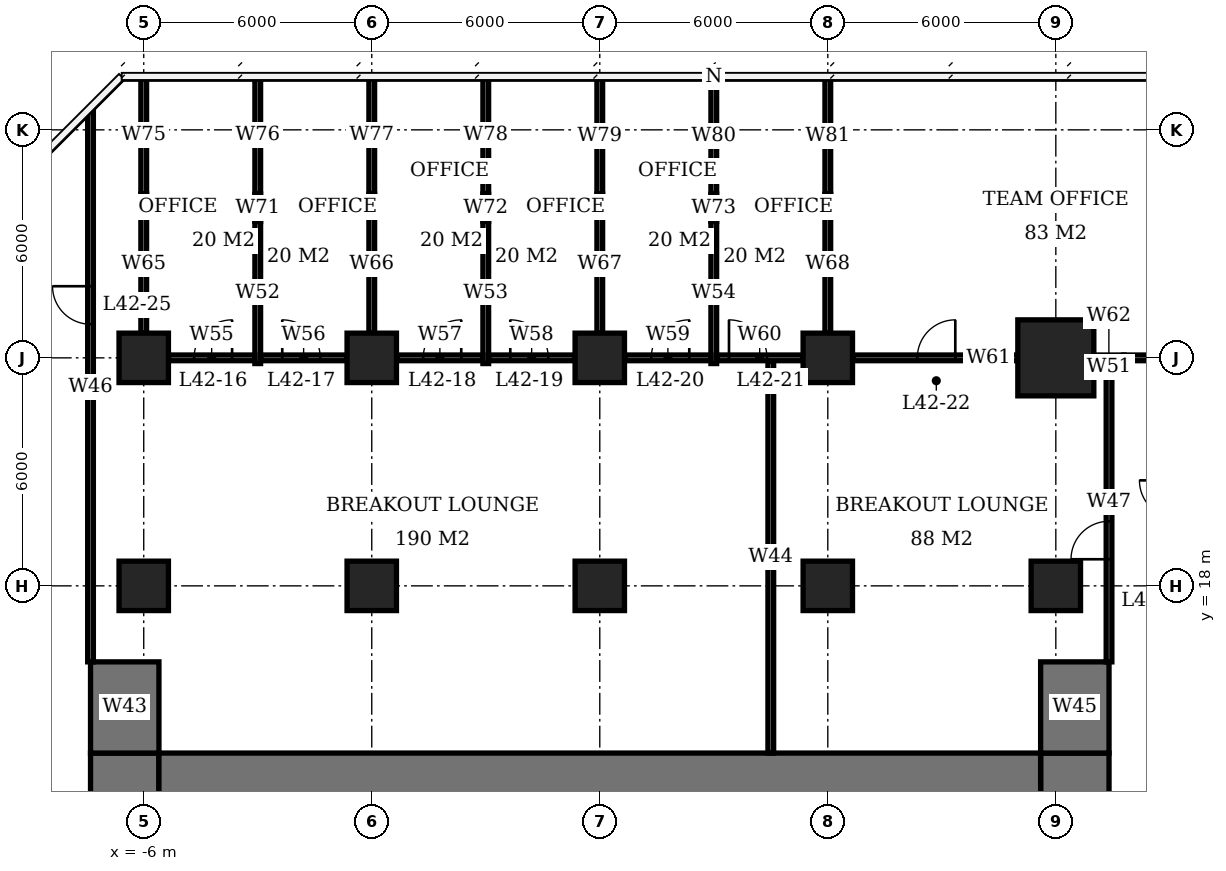
"""IFC4 building model, lengths in metres.
Left out: names, types, materials, properties, quantities, classifications, styles, units other than length and angle.
Written with IfcOpenShell. Run it as: python <this file> out.ifc"""

import sys

from ifc_helpers import new_model, si_unit, direction, frame, frame_2d, origin, origin_2d, place, context, subcontext, project, spatial, rectangle, extrude, element, fill, save


model = new_model("IFC4")
c1 = context("Model", 3, precision=1e-05, world=origin(), true_north=direction((0.0, 1.0)))
c2 = subcontext(c1, "Body", "Model", "MODEL_VIEW")
j1 = project(units=[si_unit("LENGTHUNIT", "METRE"), si_unit("PLANEANGLEUNIT", "RADIAN")], contexts=[c1])
p1 = place(None, origin())
s1 = spatial("IfcSite", under=j1, at=p1, CompositionType="ELEMENT")
p2 = place(p1, origin())
s2 = spatial("IfcBuilding", under=s1, at=p2, CompositionType="ELEMENT")
p3 = place(p2, frame((0.0, 0.0, 173.3)))
s3 = spatial("IfcBuildingStorey", under=s2, at=p3, CompositionType="ELEMENT", Elevation=173.3)
for number, where, z_axis, x_axis in (
    (1, (-6.0, 18.0, 0.0), (0.0, 0.0, 1.0), (1.0, 0.0, 0.0)),
    (2, (-6.0, 24.0, 0.0), (0.0, 0.0, 1.0), (1.0, 0.0, 0.0)),
    (3, (0.0, 18.0, 0.0), (0.0, 0.0, 1.0), (1.0, 0.0, 0.0)),
    (4, (0.0, 24.0, 0.0), (0.0, 0.0, 1.0), (1.0, 0.0, 0.0)),
    (5, (6.0, 18.0, 0.0), (0.0, 0.0, 1.0), (1.0, 0.0, 0.0)),
    (6, (6.0, 24.0, 0.0), (0.0, 0.0, 1.0), (1.0, 0.0, 0.0)),
    (7, (12.0, 18.0, 0.0), (0.0, 0.0, 1.0), (1.0, 0.0, 0.0)),
    (8, (12.0, 24.0, 0.0), (0.0, 0.0, 1.0), (1.0, 0.0, 0.0)),
    (9, (18.0, 18.0, 0.0), (0.0, 0.0, 1.0), (1.0, 0.0, 0.0)),
):
    element("IfcColumn", number, at=place(p3, frame(where, z_axis=z_axis, x_axis=x_axis)), inside=s3, PredefinedType="COLUMN", context=c2, shape_type="SweptSolid", body=[
        extrude(rectangle(XDim=1.3, YDim=1.3, at=origin_2d()), origin(), (0.0, 0.0, 1.0), 3.9),
    ])
p4 = place(p3, frame((18.0, 24.0, 0.0), z_axis=(0.0, 0.0, 1.0), x_axis=(1.0, 0.0, 0.0)))
e10 = element("IfcColumn", 10, at=p4, inside=s3, PredefinedType="COLUMN", context=c2, shape_type="SweptSolid", body=[
    extrude(rectangle(XDim=2.0, YDim=2.0, at=origin_2d()), origin(), (0.0, 0.0, 1.0), 3.9),
])
p5 = place(p3, frame((-5.6, 12.6, 0.0), z_axis=(0.0, 0.0, 1.0), x_axis=(1.0, 0.0, 0.0)))
e11 = element("IfcWall", 11, at=p5, inside=s3, PredefinedType="SHEAR", context=c2, shape_type="SweptSolid", body=[
    extrude(rectangle(XDim=23.2, YDim=2.0, at=frame_2d((11.6, 0.0))), origin(), (0.0, 0.0, 1.0), 3.9),
])
p6 = place(p3, frame((-6.5, -7.6, 0.0), z_axis=(0.0, 0.0, 1.0), x_axis=(0.0, 1.0, 0.0)))
e12 = element("IfcWall", 12, at=p6, inside=s3, PredefinedType="SHEAR", context=c2, shape_type="SweptSolid", body=[
    extrude(rectangle(XDim=21.2, YDim=1.8, at=frame_2d((10.6, 0.0))), origin(), (0.0, 0.0, 1.0), 3.9),
])
p7 = place(p6, frame((7.8, 0.0, 0.0)))
e13 = element("IfcOpeningElement", 13, at=p7, cuts=e12, PredefinedType="OPENING", context=c2, shape_type="SweptSolid", body=[
    extrude(rectangle(XDim=1.8, YDim=2.4, at=frame_2d((0.9, 1.2))), frame((0.0, 0.91, 0.0), z_axis=(0.0, -1.0, 0.0), x_axis=(1.0, 0.0, 0.0)), (0.0, 0.0, 1.0), 1.82),
])
p8 = place(p3, frame((18.5, -7.6, 0.0), z_axis=(0.0, 0.0, 1.0), x_axis=(0.0, 1.0, 0.0)))
e14 = element("IfcWall", 14, at=p8, inside=s3, PredefinedType="SHEAR", context=c2, shape_type="SweptSolid", body=[
    extrude(rectangle(XDim=21.2, YDim=1.8, at=frame_2d((10.6, 0.0))), origin(), (0.0, 0.0, 1.0), 3.9),
])
p9 = place(p8, frame((9.2, 0.0, 0.0)))
e15 = element("IfcOpeningElement", 15, at=p9, cuts=e14, PredefinedType="OPENING", context=c2, shape_type="SweptSolid", body=[
    extrude(rectangle(XDim=1.8, YDim=2.4, at=frame_2d((0.9, 1.2))), frame((0.0, 0.91, 0.0), z_axis=(0.0, -1.0, 0.0), x_axis=(1.0, 0.0, 0.0)), (0.0, 0.0, 1.0), 1.82),
])
for number, where, z_axis, x_axis in (
    (16, (-6.5, 13.6, 0.0), (0.0, 0.0, 1.0), (0.0, 1.0, 0.0)),
    (17, (18.5, 13.6, 0.0), (0.0, 0.0, 1.0), (0.0, 1.0, 0.0)),
):
    element("IfcWall", number, at=place(p3, frame(where, z_axis=z_axis, x_axis=x_axis)), inside=s3, PredefinedType="SHEAR", context=c2, shape_type="SweptSolid", body=[
        extrude(rectangle(XDim=2.4, YDim=1.8, at=frame_2d((1.2, 0.0))), origin(), (0.0, 0.0, 1.0), 3.9),
    ])
p10 = place(p3, frame((-5.35, 24.0, 0.0), z_axis=(0.0, 0.0, 1.0), x_axis=(1.0, 0.0, 0.0)))
e18 = element("IfcWall", 18, at=p10, inside=s3, PredefinedType="PARTITIONING", context=c2, shape_type="SweptSolid", body=[
    extrude(rectangle(XDim=2.275, YDim=0.15, at=frame_2d((1.138, 0.0))), origin(), (0.0, 0.0, 1.0), 3.65),
])
p11 = place(p10, frame((0.675, 0.0, 0.0)))
e19 = element("IfcOpeningElement", 19, at=p11, cuts=e18, PredefinedType="OPENING", context=c2, shape_type="SweptSolid", body=[
    extrude(rectangle(XDim=1.0, YDim=2.1, at=frame_2d((0.5, 1.05))), frame((0.0, 0.085, 0.0), z_axis=(0.0, -1.0, 0.0), x_axis=(1.0, 0.0, 0.0)), (0.0, 0.0, 1.0), 0.17),
])
p12 = place(p3, frame((-2.925, 24.0, 0.0), z_axis=(0.0, 0.0, 1.0), x_axis=(1.0, 0.0, 0.0)))
e20 = element("IfcWall", 20, at=p12, inside=s3, PredefinedType="PARTITIONING", context=c2, shape_type="SweptSolid", body=[
    extrude(rectangle(XDim=2.265, YDim=0.15, at=frame_2d((1.133, 0.0))), origin(), (0.0, 0.0, 1.0), 3.65),
])
p13 = place(p12, frame((0.57, 0.0, 0.0)))
e21 = element("IfcOpeningElement", 21, at=p13, cuts=e20, PredefinedType="OPENING", context=c2, shape_type="SweptSolid", body=[
    extrude(rectangle(XDim=1.0, YDim=2.1, at=frame_2d((0.5, 1.05))), frame((0.0, 0.085, 0.0), z_axis=(0.0, -1.0, 0.0), x_axis=(1.0, 0.0, 0.0)), (0.0, 0.0, 1.0), 0.17),
])
p14 = place(p3, frame((0.66, 24.0, 0.0), z_axis=(0.0, 0.0, 1.0), x_axis=(1.0, 0.0, 0.0)))
e22 = element("IfcWall", 22, at=p14, inside=s3, PredefinedType="PARTITIONING", context=c2, shape_type="SweptSolid", body=[
    extrude(rectangle(XDim=2.265, YDim=0.15, at=frame_2d((1.133, 0.0))), origin(), (0.0, 0.0, 1.0), 3.65),
])
p15 = place(p14, frame((0.695, 0.0, 0.0)))
e23 = element("IfcOpeningElement", 23, at=p15, cuts=e22, PredefinedType="OPENING", context=c2, shape_type="SweptSolid", body=[
    extrude(rectangle(XDim=1.0, YDim=2.1, at=frame_2d((0.5, 1.05))), frame((0.0, 0.085, 0.0), z_axis=(0.0, -1.0, 0.0), x_axis=(1.0, 0.0, 0.0)), (0.0, 0.0, 1.0), 0.17),
])
p16 = place(p3, frame((3.075, 24.0, 0.0), z_axis=(0.0, 0.0, 1.0), x_axis=(1.0, 0.0, 0.0)))
e24 = element("IfcWall", 24, at=p16, inside=s3, PredefinedType="PARTITIONING", context=c2, shape_type="SweptSolid", body=[
    extrude(rectangle(XDim=2.265, YDim=0.15, at=frame_2d((1.133, 0.0))), origin(), (0.0, 0.0, 1.0), 3.65),
])
p17 = place(p16, frame((0.57, 0.0, 0.0)))
e25 = element("IfcOpeningElement", 25, at=p17, cuts=e24, PredefinedType="OPENING", context=c2, shape_type="SweptSolid", body=[
    extrude(rectangle(XDim=1.0, YDim=2.1, at=frame_2d((0.5, 1.05))), frame((0.0, 0.085, 0.0), z_axis=(0.0, -1.0, 0.0), x_axis=(1.0, 0.0, 0.0)), (0.0, 0.0, 1.0), 0.17),
])
p18 = place(p3, frame((6.66, 24.0, 0.0), z_axis=(0.0, 0.0, 1.0), x_axis=(1.0, 0.0, 0.0)))
e26 = element("IfcWall", 26, at=p18, inside=s3, PredefinedType="PARTITIONING", context=c2, shape_type="SweptSolid", body=[
    extrude(rectangle(XDim=2.265, YDim=0.15, at=frame_2d((1.133, 0.0))), origin(), (0.0, 0.0, 1.0), 3.65),
])
p19 = place(p18, frame((0.695, 0.0, 0.0)))
e27 = element("IfcOpeningElement", 27, at=p19, cuts=e26, PredefinedType="OPENING", context=c2, shape_type="SweptSolid", body=[
    extrude(rectangle(XDim=1.0, YDim=2.1, at=frame_2d((0.5, 1.05))), frame((0.0, 0.085, 0.0), z_axis=(0.0, -1.0, 0.0), x_axis=(1.0, 0.0, 0.0)), (0.0, 0.0, 1.0), 0.17),
])
p20 = place(p3, frame((9.075, 24.0, 0.0), z_axis=(0.0, 0.0, 1.0), x_axis=(1.0, 0.0, 0.0)))
e28 = element("IfcWall", 28, at=p20, inside=s3, PredefinedType="PARTITIONING", context=c2, shape_type="SweptSolid", body=[
    extrude(rectangle(XDim=2.265, YDim=0.15, at=frame_2d((1.133, 0.0))), origin(), (0.0, 0.0, 1.0), 3.65),
])
p21 = place(p20, frame((0.325, 0.0, 0.0)))
e29 = element("IfcOpeningElement", 29, at=p21, cuts=e28, PredefinedType="OPENING", context=c2, shape_type="SweptSolid", body=[
    extrude(rectangle(XDim=1.0, YDim=2.1, at=frame_2d((0.5, 1.05))), frame((0.0, 0.085, 0.0), z_axis=(0.0, -1.0, 0.0), x_axis=(1.0, 0.0, 0.0)), (0.0, 0.0, 1.0), 0.17),
])
p22 = place(p3, frame((12.66, 24.0, 0.0), z_axis=(0.0, 0.0, 1.0), x_axis=(1.0, 0.0, 0.0)))
e30 = element("IfcWall", 30, at=p22, inside=s3, PredefinedType="PARTITIONING", context=c2, shape_type="SweptSolid", body=[
    extrude(rectangle(XDim=4.34, YDim=0.15, at=frame_2d((2.17, 0.0))), origin(), (0.0, 0.0, 1.0), 3.65),
])
p23 = place(p22, frame((1.695, 0.0, 0.0)))
e31 = element("IfcOpeningElement", 31, at=p23, cuts=e30, PredefinedType="OPENING", context=c2, shape_type="SweptSolid", body=[
    extrude(rectangle(XDim=1.0, YDim=2.1, at=frame_2d((0.5, 1.05))), frame((0.0, 0.085, 0.0), z_axis=(0.0, -1.0, 0.0), x_axis=(1.0, 0.0, 0.0)), (0.0, 0.0, 1.0), 0.17),
])
p24 = place(p3, frame((19.0, 24.0, 0.0), z_axis=(0.0, 0.0, 1.0), x_axis=(1.0, 0.0, 0.0)))
e32 = element("IfcWall", 32, at=p24, inside=s3, PredefinedType="PARTITIONING", context=c2, shape_type="SweptSolid", body=[
    extrude(rectangle(XDim=0.792, YDim=0.15, at=frame_2d((0.396, 0.0))), origin(), (0.0, 0.0, 1.0), 2.65),
])
p25 = place(p3, frame((19.792, 24.0, 0.0), z_axis=(0.0, 0.0, 1.0), x_axis=(1.0, 0.0, 0.0)))
e33 = element("IfcWall", 33, at=p25, inside=s3, PredefinedType="PARTITIONING", context=c2, shape_type="SweptSolid", body=[
    extrude(rectangle(XDim=4.283, YDim=0.15, at=frame_2d((2.142, 0.0))), origin(), (0.0, 0.0, 1.0), 3.65),
])
p26 = place(p3, frame((-6.0, 24.65, 0.0), z_axis=(0.0, 0.0, 1.0), x_axis=(0.0, 1.0, 0.0)))
e34 = element("IfcWall", 34, at=p26, inside=s3, PredefinedType="PARTITIONING", context=c2, shape_type="SweptSolid", body=[
    extrude(rectangle(XDim=3.66, YDim=0.15, at=frame_2d((1.83, 0.0))), origin(), (0.0, 0.0, 1.0), 2.65),
])
p27 = place(p3, frame((-6.0, 28.31, 0.0), z_axis=(0.0, 0.0, 1.0), x_axis=(0.0, 1.0, 0.0)))
e35 = element("IfcWall", 35, at=p27, inside=s3, PredefinedType="PARTITIONING", context=c2, shape_type="SweptSolid", body=[
    extrude(rectangle(XDim=3.09, YDim=0.15, at=frame_2d((1.545, 0.0))), origin(), (0.0, 0.0, 1.0), 3.65),
])
p28 = place(p3, frame((-3.0, 23.85, 0.0), z_axis=(0.0, 0.0, 1.0), x_axis=(0.0, 1.0, 0.0)))
e36 = element("IfcWall", 36, at=p28, inside=s3, PredefinedType="PARTITIONING", context=c2, shape_type="SweptSolid", body=[
    extrude(rectangle(XDim=3.74, YDim=0.15, at=frame_2d((1.87, 0.0))), origin(), (0.0, 0.0, 1.0), 3.65),
])
p29 = place(p3, frame((-3.0, 27.59, 0.0), z_axis=(0.0, 0.0, 1.0), x_axis=(0.0, 1.0, 0.0)))
e37 = element("IfcWall", 37, at=p29, inside=s3, PredefinedType="PARTITIONING", context=c2, shape_type="SweptSolid", body=[
    extrude(rectangle(XDim=0.72, YDim=0.15, at=frame_2d((0.36, 0.0))), origin(), (0.0, 0.0, 1.0), 2.65),
])
p30 = place(p3, frame((-3.0, 28.31, 0.0), z_axis=(0.0, 0.0, 1.0), x_axis=(0.0, 1.0, 0.0)))
e38 = element("IfcWall", 38, at=p30, inside=s3, PredefinedType="PARTITIONING", context=c2, shape_type="SweptSolid", body=[
    extrude(rectangle(XDim=3.09, YDim=0.15, at=frame_2d((1.545, 0.0))), origin(), (0.0, 0.0, 1.0), 3.65),
])
p31 = place(p3, frame((0.0, 24.65, 0.0), z_axis=(0.0, 0.0, 1.0), x_axis=(0.0, 1.0, 0.0)))
e39 = element("IfcWall", 39, at=p31, inside=s3, PredefinedType="PARTITIONING", context=c2, shape_type="SweptSolid", body=[
    extrude(rectangle(XDim=3.66, YDim=0.15, at=frame_2d((1.83, 0.0))), origin(), (0.0, 0.0, 1.0), 2.65),
])
p32 = place(p3, frame((0.0, 28.31, 0.0), z_axis=(0.0, 0.0, 1.0), x_axis=(0.0, 1.0, 0.0)))
e40 = element("IfcWall", 40, at=p32, inside=s3, PredefinedType="PARTITIONING", context=c2, shape_type="SweptSolid", body=[
    extrude(rectangle(XDim=3.09, YDim=0.15, at=frame_2d((1.545, 0.0))), origin(), (0.0, 0.0, 1.0), 3.65),
])
p33 = place(p3, frame((3.0, 23.85, 0.0), z_axis=(0.0, 0.0, 1.0), x_axis=(0.0, 1.0, 0.0)))
e41 = element("IfcWall", 41, at=p33, inside=s3, PredefinedType="PARTITIONING", context=c2, shape_type="SweptSolid", body=[
    extrude(rectangle(XDim=3.74, YDim=0.15, at=frame_2d((1.87, 0.0))), origin(), (0.0, 0.0, 1.0), 3.65),
])
p34 = place(p3, frame((3.0, 27.59, 0.0), z_axis=(0.0, 0.0, 1.0), x_axis=(0.0, 1.0, 0.0)))
e42 = element("IfcWall", 42, at=p34, inside=s3, PredefinedType="PARTITIONING", context=c2, shape_type="SweptSolid", body=[
    extrude(rectangle(XDim=0.72, YDim=0.15, at=frame_2d((0.36, 0.0))), origin(), (0.0, 0.0, 1.0), 2.65),
])
p35 = place(p3, frame((3.0, 28.31, 0.0), z_axis=(0.0, 0.0, 1.0), x_axis=(0.0, 1.0, 0.0)))
e43 = element("IfcWall", 43, at=p35, inside=s3, PredefinedType="PARTITIONING", context=c2, shape_type="SweptSolid", body=[
    extrude(rectangle(XDim=3.09, YDim=0.15, at=frame_2d((1.545, 0.0))), origin(), (0.0, 0.0, 1.0), 3.65),
])
p36 = place(p3, frame((6.0, 24.65, 0.0), z_axis=(0.0, 0.0, 1.0), x_axis=(0.0, 1.0, 0.0)))
e44 = element("IfcWall", 44, at=p36, inside=s3, PredefinedType="PARTITIONING", context=c2, shape_type="SweptSolid", body=[
    extrude(rectangle(XDim=3.66, YDim=0.15, at=frame_2d((1.83, 0.0))), origin(), (0.0, 0.0, 1.0), 2.65),
])
p37 = place(p3, frame((6.0, 28.31, 0.0), z_axis=(0.0, 0.0, 1.0), x_axis=(0.0, 1.0, 0.0)))
e45 = element("IfcWall", 45, at=p37, inside=s3, PredefinedType="PARTITIONING", context=c2, shape_type="SweptSolid", body=[
    extrude(rectangle(XDim=3.04, YDim=0.15, at=frame_2d((1.52, 0.0))), origin(), (0.0, 0.0, 1.0), 3.65),
])
p38 = place(p3, frame((9.0, 23.85, 0.0), z_axis=(0.0, 0.0, 1.0), x_axis=(0.0, 1.0, 0.0)))
e46 = element("IfcWall", 46, at=p38, inside=s3, PredefinedType="PARTITIONING", context=c2, shape_type="SweptSolid", body=[
    extrude(rectangle(XDim=3.74, YDim=0.15, at=frame_2d((1.87, 0.0))), origin(), (0.0, 0.0, 1.0), 3.65),
])
p39 = place(p3, frame((9.0, 27.59, 0.0), z_axis=(0.0, 0.0, 1.0), x_axis=(0.0, 1.0, 0.0)))
e47 = element("IfcWall", 47, at=p39, inside=s3, PredefinedType="PARTITIONING", context=c2, shape_type="SweptSolid", body=[
    extrude(rectangle(XDim=0.72, YDim=0.15, at=frame_2d((0.36, 0.0))), origin(), (0.0, 0.0, 1.0), 2.65),
])
p40 = place(p3, frame((9.0, 28.31, 0.0), z_axis=(0.0, 0.0, 1.0), x_axis=(0.0, 1.0, 0.0)))
e48 = element("IfcWall", 48, at=p40, inside=s3, PredefinedType="PARTITIONING", context=c2, shape_type="SweptSolid", body=[
    extrude(rectangle(XDim=3.04, YDim=0.15, at=frame_2d((1.52, 0.0))), origin(), (0.0, 0.0, 1.0), 3.65),
])
p41 = place(p3, frame((12.0, 24.65, 0.0), z_axis=(0.0, 0.0, 1.0), x_axis=(0.0, 1.0, 0.0)))
e49 = element("IfcWall", 49, at=p41, inside=s3, PredefinedType="PARTITIONING", context=c2, shape_type="SweptSolid", body=[
    extrude(rectangle(XDim=3.66, YDim=0.15, at=frame_2d((1.83, 0.0))), origin(), (0.0, 0.0, 1.0), 2.65),
])
p42 = place(p3, frame((12.0, 28.31, 0.0), z_axis=(0.0, 0.0, 1.0), x_axis=(0.0, 1.0, 0.0)))
e50 = element("IfcWall", 50, at=p42, inside=s3, PredefinedType="PARTITIONING", context=c2, shape_type="SweptSolid", body=[
    extrude(rectangle(XDim=3.04, YDim=0.15, at=frame_2d((1.52, 0.0))), origin(), (0.0, 0.0, 1.0), 3.65),
])
p43 = place(p3, frame((-7.4, 16.0, 0.0), z_axis=(0.0, 0.0, 1.0), x_axis=(0.0, 1.0, 0.0)))
e51 = element("IfcWall", 51, at=p43, inside=s3, PredefinedType="PARTITIONING", context=c2, shape_type="SweptSolid", body=[
    extrude(rectangle(XDim=14.489, YDim=0.15, at=frame_2d((7.245, 0.0))), origin(), (0.0, 0.0, 1.0), 3.65),
])
p44 = place(p43, frame((8.885, 0.0, 0.0)))
e52 = element("IfcOpeningElement", 52, at=p44, cuts=e51, PredefinedType="OPENING", context=c2, shape_type="SweptSolid", body=[
    extrude(rectangle(XDim=1.0, YDim=2.1, at=frame_2d((0.5, 1.05))), frame((0.0, 0.085, 0.0), z_axis=(0.0, -1.0, 0.0), x_axis=(1.0, 0.0, 0.0)), (0.0, 0.0, 1.0), 0.17),
])
p45 = place(p3, frame((10.5, 13.6, 0.0), z_axis=(0.0, 0.0, 1.0), x_axis=(0.0, 1.0, 0.0)))
e53 = element("IfcWall", 53, at=p45, inside=s3, PredefinedType="PARTITIONING", context=c2, shape_type="SweptSolid", body=[
    extrude(rectangle(XDim=10.325, YDim=0.15, at=frame_2d((5.163, 0.0))), origin(), (0.0, 0.0, 1.0), 3.65),
])
p46 = place(p3, frame((19.4, 16.0, 0.0), z_axis=(0.0, 0.0, 1.0), x_axis=(0.0, 1.0, 0.0)))
e54 = element("IfcWall", 54, at=p46, inside=s3, PredefinedType="PARTITIONING", context=c2, shape_type="SweptSolid", body=[
    extrude(rectangle(XDim=7.608, YDim=0.15, at=frame_2d((3.804, 0.0))), origin(), (0.0, 0.0, 1.0), 3.65),
])
p47 = place(p46, frame((2.7, 0.0, 0.0)))
e55 = element("IfcOpeningElement", 55, at=p47, cuts=e54, PredefinedType="OPENING", context=c2, shape_type="SweptSolid", body=[
    extrude(rectangle(XDim=1.0, YDim=2.1, at=frame_2d((0.5, 1.05))), frame((0.0, 0.085, 0.0), z_axis=(0.0, -1.0, 0.0), x_axis=(1.0, 0.0, 0.0)), (0.0, 0.0, 1.0), 0.17),
])
p48 = place(p3, frame((19.4, 23.608, 0.0), z_axis=(0.0, 0.0, 1.0), x_axis=(0.0, 1.0, 0.0)))
e56 = element("IfcWall", 56, at=p48, inside=s3, PredefinedType="PARTITIONING", context=c2, shape_type="SweptSolid", body=[
    extrude(rectangle(XDim=0.317, YDim=0.15, at=frame_2d((0.159, 0.0))), origin(), (0.0, 0.0, 1.0), 2.65),
])
p49 = place(p11, origin())
e57 = element("IfcDoor", 57, at=p49, inside=s3, OperationType="SINGLE_SWING_RIGHT", PredefinedType="DOOR", context=c2, shape_type="SweptSolid", body=[
    extrude(rectangle(XDim=1.0, YDim=2.1, at=frame_2d((0.5, 1.05))), frame((0.0, 0.025, 0.0), z_axis=(0.0, -1.0, 0.0), x_axis=(1.0, 0.0, 0.0)), (0.0, 0.0, 1.0), 0.05),
])
fill(e19, e57)
p50 = place(p13, origin())
e58 = element("IfcDoor", 58, at=p50, inside=s3, OperationType="SINGLE_SWING_LEFT", PredefinedType="DOOR", context=c2, shape_type="SweptSolid", body=[
    extrude(rectangle(XDim=1.0, YDim=2.1, at=frame_2d((0.5, 1.05))), frame((0.0, 0.025, 0.0), z_axis=(0.0, -1.0, 0.0), x_axis=(1.0, 0.0, 0.0)), (0.0, 0.0, 1.0), 0.05),
])
fill(e21, e58)
p51 = place(p15, origin())
e59 = element("IfcDoor", 59, at=p51, inside=s3, OperationType="SINGLE_SWING_RIGHT", PredefinedType="DOOR", context=c2, shape_type="SweptSolid", body=[
    extrude(rectangle(XDim=1.0, YDim=2.1, at=frame_2d((0.5, 1.05))), frame((0.0, 0.025, 0.0), z_axis=(0.0, -1.0, 0.0), x_axis=(1.0, 0.0, 0.0)), (0.0, 0.0, 1.0), 0.05),
])
fill(e23, e59)
p52 = place(p17, origin())
e60 = element("IfcDoor", 60, at=p52, inside=s3, OperationType="SINGLE_SWING_LEFT", PredefinedType="DOOR", context=c2, shape_type="SweptSolid", body=[
    extrude(rectangle(XDim=1.0, YDim=2.1, at=frame_2d((0.5, 1.05))), frame((0.0, 0.025, 0.0), z_axis=(0.0, -1.0, 0.0), x_axis=(1.0, 0.0, 0.0)), (0.0, 0.0, 1.0), 0.05),
])
fill(e25, e60)
p53 = place(p19, origin())
e61 = element("IfcDoor", 61, at=p53, inside=s3, OperationType="SINGLE_SWING_RIGHT", PredefinedType="DOOR", context=c2, shape_type="SweptSolid", body=[
    extrude(rectangle(XDim=1.0, YDim=2.1, at=frame_2d((0.5, 1.05))), frame((0.0, 0.025, 0.0), z_axis=(0.0, -1.0, 0.0), x_axis=(1.0, 0.0, 0.0)), (0.0, 0.0, 1.0), 0.05),
])
fill(e27, e61)
p54 = place(p21, origin())
e62 = element("IfcDoor", 62, at=p54, inside=s3, OperationType="SINGLE_SWING_LEFT", PredefinedType="DOOR", context=c2, shape_type="SweptSolid", body=[
    extrude(rectangle(XDim=1.0, YDim=2.1, at=frame_2d((0.5, 1.05))), frame((0.0, 0.025, 0.0), z_axis=(0.0, -1.0, 0.0), x_axis=(1.0, 0.0, 0.0)), (0.0, 0.0, 1.0), 0.05),
])
fill(e29, e62)
p55 = place(p23, origin())
e63 = element("IfcDoor", 63, at=p55, inside=s3, OperationType="SINGLE_SWING_RIGHT", PredefinedType="DOOR", context=c2, shape_type="SweptSolid", body=[
    extrude(rectangle(XDim=1.0, YDim=2.1, at=frame_2d((0.5, 1.05))), frame((0.0, 0.025, 0.0), z_axis=(0.0, -1.0, 0.0), x_axis=(1.0, 0.0, 0.0)), (0.0, 0.0, 1.0), 0.05),
])
fill(e31, e63)
p56 = place(p44, origin())
e64 = element("IfcDoor", 64, at=p56, inside=s3, OperationType="SINGLE_SWING_RIGHT", PredefinedType="DOOR", context=c2, shape_type="SweptSolid", body=[
    extrude(rectangle(XDim=1.0, YDim=2.1, at=frame_2d((0.5, 1.05))), frame((0.0, 0.025, 0.0), z_axis=(0.0, -1.0, 0.0), x_axis=(1.0, 0.0, 0.0)), (0.0, 0.0, 1.0), 0.05),
])
fill(e52, e64)
p57 = place(p47, origin())
e65 = element("IfcDoor", 65, at=p57, inside=s3, OperationType="SINGLE_SWING_LEFT", PredefinedType="DOOR", context=c2, shape_type="SweptSolid", body=[
    extrude(rectangle(XDim=1.0, YDim=2.1, at=frame_2d((0.5, 1.05))), frame((0.0, 0.025, 0.0), z_axis=(0.0, -1.0, 0.0), x_axis=(1.0, 0.0, 0.0)), (0.0, 0.0, 1.0), 0.05),
])
fill(e55, e65)
save(model, sys.argv[1])
